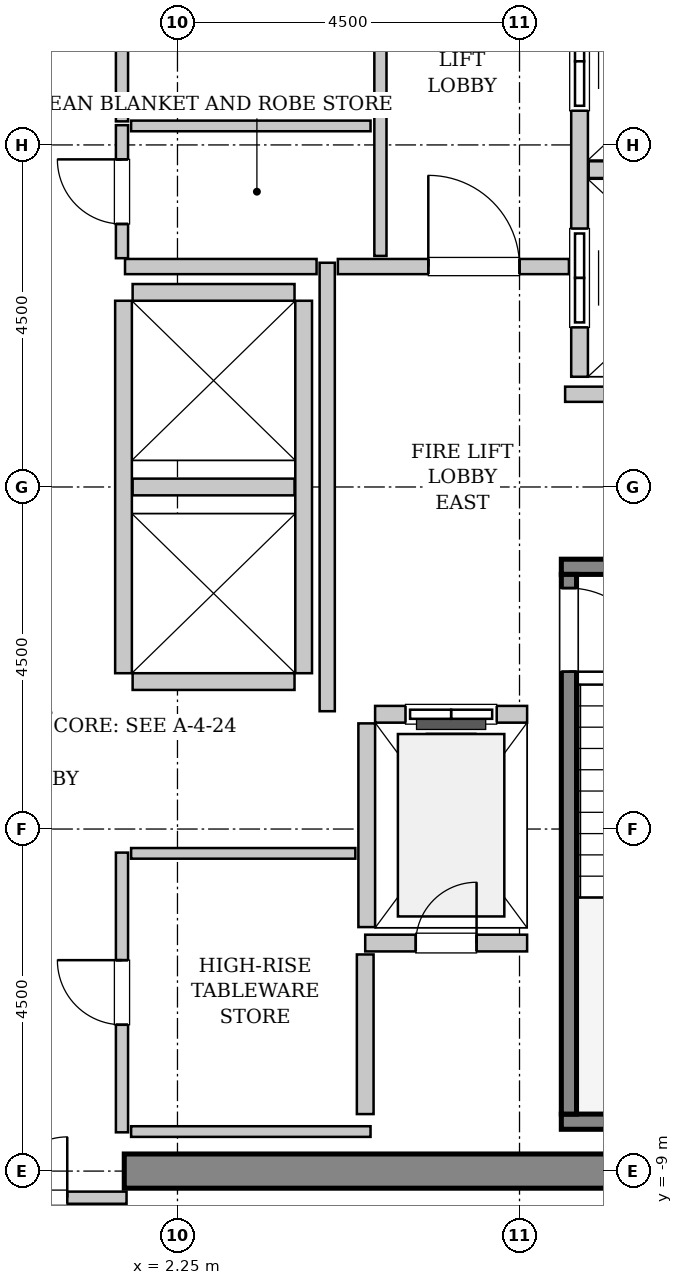
"""IFC4 building model, lengths in metres.
Left out: names, types, materials, properties, quantities, classifications, styles, units other than length and angle.
Written with IfcOpenShell. Run it as: python <this file> out.ifc"""

import sys

from ifc_helpers import new_model, si_unit, direction, frame, frame_2d, origin, place, context, subcontext, project, spatial, rectangle, extrude, source, transform, mapped, element, fill, save


model = new_model("IFC4")
c1 = context("Model", 3, precision=1e-05, world=origin(), true_north=direction((0.0, 1.0)))
c2 = subcontext(c1, "Body", "Model", "MODEL_VIEW")
j1 = project(units=[si_unit("LENGTHUNIT", "METRE"), si_unit("PLANEANGLEUNIT", "RADIAN")], contexts=[c1])
p1 = place(None, origin())
s1 = spatial("IfcSite", under=j1, at=p1, CompositionType="ELEMENT")
p2 = place(p1, origin())
s2 = spatial("IfcBuilding", under=s1, at=p2, CompositionType="ELEMENT")
p3 = place(p2, frame((0.0, 0.0, 298.8)))
s3 = spatial("IfcBuildingStorey", under=s2, at=p3, CompositionType="ELEMENT", Elevation=298.8)
m1 = source(origin(), c2, "Body", "SweptSolid", [
    extrude(rectangle(XDim=9.925, YDim=0.45, at=frame_2d((4.962, 0.0))), origin(), (0.0, 0.0, 1.0), 3.8),
])
p4 = place(p3, frame((1.55, -9.0, 0.0), z_axis=(0.0, 0.0, 1.0), x_axis=(1.0, 0.0, 0.0)))
e1 = element("IfcWall", 1, at=p4, inside=s3, PredefinedType="SHEAR", context=c2, shape_type="MappedRepresentation", body=[
    mapped(m1, transform((0.0, 0.0, 0.0), x_axis=(1.0, 0.0, 0.0), y_axis=(0.0, 1.0, 0.0), z_axis=(0.0, 0.0, 1.0), scale=1.0)),
])
m2 = source(origin(), c2, "Body", "SweptSolid", [
    extrude(rectangle(XDim=3.4, YDim=0.2, at=frame_2d((1.7, 0.0))), origin(), (0.0, 0.0, 1.0), 3.8),
])
p5 = place(p3, frame((7.3, -1.05, 0.0), z_axis=(0.0, 0.0, 1.0), x_axis=(1.0, 0.0, 0.0)))
e2 = element("IfcWall", 2, at=p5, inside=s3, PredefinedType="SOLIDWALL", context=c2, shape_type="MappedRepresentation", body=[
    mapped(m2, transform((0.0, 0.0, 0.0), x_axis=(1.0, 0.0, 0.0), y_axis=(0.0, 1.0, 0.0), z_axis=(0.0, 0.0, 1.0), scale=1.0)),
])
m3 = source(origin(), c2, "Body", "SweptSolid", [
    extrude(rectangle(XDim=3.73, YDim=0.2, at=frame_2d((1.865, 0.0))), origin(), (0.0, 0.0, 1.0), 3.8),
])
p6 = place(p3, frame((7.3, -8.35, 0.0), z_axis=(0.0, 0.0, 1.0), x_axis=(1.0, 0.0, 0.0)))
e3 = element("IfcWall", 3, at=p6, inside=s3, PredefinedType="SOLIDWALL", context=c2, shape_type="MappedRepresentation", body=[
    mapped(m3, transform((0.0, 0.0, 0.0), x_axis=(1.0, 0.0, 0.0), y_axis=(0.0, 1.0, 0.0), z_axis=(0.0, 0.0, 1.0), scale=1.0)),
])
m4 = source(origin(), c2, "Body", "SweptSolid", [
    extrude(rectangle(XDim=7.1, YDim=0.2, at=frame_2d((3.55, 0.0))), origin(), (0.0, 0.0, 1.0), 3.8),
])
p7 = place(p3, frame((7.4, -1.15, 0.0), z_axis=(0.0, 0.0, 1.0), x_axis=(0.0, -1.0, 0.0)))
e4 = element("IfcWall", 4, at=p7, inside=s3, PredefinedType="SOLIDWALL", context=c2, shape_type="MappedRepresentation", body=[
    mapped(m4, transform((0.0, 0.0, 0.0), x_axis=(1.0, 0.0, 0.0), y_axis=(0.0, 1.0, 0.0), z_axis=(0.0, 0.0, 1.0), scale=1.0)),
])
p8 = place(p7, frame((0.18, 0.0, 0.0)))
e5 = element("IfcOpeningElement", 5, at=p8, cuts=e4, PredefinedType="OPENING", context=c2, shape_type="SweptSolid", body=[
    extrude(rectangle(XDim=1.1, YDim=2.15, at=frame_2d((0.55, 1.075))), frame((0.0, 0.11, 0.0), z_axis=(0.0, -1.0, 0.0), x_axis=(1.0, 0.0, 0.0)), (0.0, 0.0, 1.0), 0.22),
])
m5 = source(origin(), c2, "Body", "SweptSolid", [
    extrude(rectangle(XDim=2.0, YDim=0.22, at=frame_2d((1.0, 0.0))), origin(), (0.0, 0.0, 1.0), 3.535),
])
p9 = place(p3, frame((6.85, -2.99, 0.0), z_axis=(0.0, 0.0, 1.0), x_axis=(-1.0, 0.0, 0.0)))
e6 = element("IfcWall", 6, at=p9, inside=s3, PredefinedType="SOLIDWALL", context=c2, shape_type="MappedRepresentation", body=[
    mapped(m5, transform((0.0, 0.0, 0.0), x_axis=(1.0, 0.0, 0.0), y_axis=(0.0, 1.0, 0.0), z_axis=(0.0, 0.0, 1.0), scale=1.0)),
])
p10 = place(p9, frame((0.4, 0.0, 0.0)))
e7 = element("IfcOpeningElement", 7, at=p10, cuts=e6, PredefinedType="OPENING", context=c2, shape_type="SweptSolid", body=[
    extrude(rectangle(XDim=1.2, YDim=2.2, at=frame_2d((0.6, 1.1))), frame((0.0, 0.12, 0.0), z_axis=(0.0, -1.0, 0.0), x_axis=(1.0, 0.0, 0.0)), (0.0, 0.0, 1.0), 0.24),
])
m6 = source(origin(), c2, "Body", "SweptSolid", [
    extrude(rectangle(XDim=2.68, YDim=0.22, at=frame_2d((1.34, 0.0))), origin(), (0.0, 0.0, 1.0), 3.535),
])
p11 = place(p3, frame((4.74, -3.11, 0.0), z_axis=(0.0, 0.0, 1.0), x_axis=(0.0, -1.0, 0.0)))
e8 = element("IfcWall", 8, at=p11, inside=s3, PredefinedType="SOLIDWALL", context=c2, shape_type="MappedRepresentation", body=[
    mapped(m6, transform((0.0, 0.0, 0.0), x_axis=(1.0, 0.0, 0.0), y_axis=(0.0, 1.0, 0.0), z_axis=(0.0, 0.0, 1.0), scale=1.0)),
])
m7 = source(origin(), c2, "Body", "SweptSolid", [
    extrude(rectangle(XDim=5.45, YDim=0.22, at=frame_2d((2.725, 0.0))), origin(), (0.0, 0.0, 1.0), 3.535),
])
p12 = place(p3, frame((7.54, 6.9, 0.0), z_axis=(0.0, 0.0, 1.0), x_axis=(0.0, -1.0, 0.0)))
e9 = element("IfcWall", 9, at=p12, inside=s3, PredefinedType="SOLIDWALL", context=c2, shape_type="MappedRepresentation", body=[
    mapped(m7, transform((0.0, 0.0, 0.0), x_axis=(1.0, 0.0, 0.0), y_axis=(0.0, 1.0, 0.0), z_axis=(0.0, 0.0, 1.0), scale=1.0)),
])
p13 = place(p12, frame((3.5, 0.0, 0.0)))
e10 = element("IfcOpeningElement", 10, at=p13, cuts=e9, PredefinedType="OPENING", context=c2, shape_type="SweptSolid", body=[
    extrude(rectangle(XDim=1.3, YDim=2.3, at=frame_2d((0.65, 1.15))), frame((0.0, 0.12, 0.0), z_axis=(0.0, -1.0, 0.0), x_axis=(1.0, 0.0, 0.0)), (0.0, 0.0, 1.0), 0.24),
])
p14 = place(p12, frame((0.65, 0.0, 0.0)))
e11 = element("IfcOpeningElement", 11, at=p14, cuts=e9, PredefinedType="OPENING", context=c2, shape_type="SweptSolid", body=[
    extrude(rectangle(XDim=1.3, YDim=2.3, at=frame_2d((0.65, 1.15))), frame((0.0, 0.12, 0.0), z_axis=(0.0, -1.0, 0.0), x_axis=(1.0, 0.0, 0.0)), (0.0, 0.0, 1.0), 0.24),
])
m8 = source(origin(), c2, "Body", "SweptSolid", [
    extrude(rectangle(XDim=2.78, YDim=0.22, at=frame_2d((1.39, 0.0))), origin(), (0.0, 0.0, 1.0), 3.535),
])
p15 = place(p3, frame((7.66, 4.175, 0.0), z_axis=(0.0, 0.0, 1.0), x_axis=(1.0, 0.0, 0.0)))
e12 = element("IfcWall", 12, at=p15, inside=s3, PredefinedType="SOLIDWALL", context=c2, shape_type="MappedRepresentation", body=[
    mapped(m8, transform((0.0, 0.0, 0.0), x_axis=(1.0, 0.0, 0.0), y_axis=(0.0, 1.0, 0.0), z_axis=(0.0, 0.0, 1.0), scale=1.0)),
])
m9 = source(origin(), c2, "Body", "SweptSolid", [
    extrude(rectangle(XDim=4.9, YDim=0.22, at=frame_2d((2.45, 0.0))), origin(), (0.0, 0.0, 1.0), 3.535),
])
for number, where, z_axis, x_axis in (
    (13, (1.54, 2.45, 0.0), (0.0, 0.0, 1.0), (0.0, -1.0, 0.0)),
    (14, (3.91, -2.45, 0.0), (0.0, 0.0, 1.0), (0.0, 1.0, 0.0)),
):
    element("IfcWall", number, at=place(p3, frame(where, z_axis=z_axis, x_axis=x_axis)), inside=s3, PredefinedType="SOLIDWALL", context=c2, shape_type="MappedRepresentation", body=[
        mapped(m9, transform((0.0, 0.0, 0.0), x_axis=(1.0, 0.0, 0.0), y_axis=(0.0, 1.0, 0.0), z_axis=(0.0, 0.0, 1.0), scale=1.0)),
    ])
m10 = source(origin(), c2, "Body", "SweptSolid", [
    extrude(rectangle(XDim=2.13, YDim=0.22, at=frame_2d((1.065, 0.0))), origin(), (0.0, 0.0, 1.0), 3.535),
])
for number, where, z_axis, x_axis in (
    (15, (1.66, -2.56, 0.0), (0.0, 0.0, 1.0), (1.0, 0.0, 0.0)),
    (16, (1.66, 0.0, 0.0), (0.0, 0.0, 1.0), (1.0, 0.0, 0.0)),
    (17, (3.79, 2.56, 0.0), (0.0, 0.0, 1.0), (-1.0, 0.0, 0.0)),
):
    element("IfcWall", number, at=place(p3, frame(where, z_axis=z_axis, x_axis=x_axis)), inside=s3, PredefinedType="SOLIDWALL", context=c2, shape_type="MappedRepresentation", body=[
        mapped(m10, transform((0.0, 0.0, 0.0), x_axis=(1.0, 0.0, 0.0), y_axis=(0.0, 1.0, 0.0), z_axis=(0.0, 0.0, 1.0), scale=1.0)),
    ])
p16 = place(p3, frame((4.72, -6.0, 0.0), z_axis=(0.0, 0.0, 1.0), x_axis=(1.0, 0.0, 0.0)))
e18 = element("IfcWall", 18, at=p16, inside=s3, PredefinedType="SOLIDWALL", context=c2, shape_type="MappedRepresentation", body=[
    mapped(m10, transform((0.0, 0.0, 0.0), x_axis=(1.0, 0.0, 0.0), y_axis=(0.0, 1.0, 0.0), z_axis=(0.0, 0.0, 1.0), scale=1.0)),
])
p17 = place(p16, frame((0.665, 0.0, 0.0)))
e19 = element("IfcOpeningElement", 19, at=p17, cuts=e18, PredefinedType="OPENING", context=c2, shape_type="SweptSolid", body=[
    extrude(rectangle(XDim=0.8, YDim=2.0, at=frame_2d((0.4, 1.0))), frame((0.0, 0.12, 0.0), z_axis=(0.0, -1.0, 0.0), x_axis=(1.0, 0.0, 0.0)), (0.0, 0.0, 1.0), 0.24),
])
m11 = source(origin(), c2, "Body", "SweptSolid", [
    extrude(rectangle(XDim=2.1, YDim=0.22, at=frame_2d((1.05, 0.0))), origin(), (0.0, 0.0, 1.0), 3.535),
])
p18 = place(p3, frame((4.72, -8.25, 0.0), z_axis=(0.0, 0.0, 1.0), x_axis=(0.0, 1.0, 0.0)))
e20 = element("IfcWall", 20, at=p18, inside=s3, PredefinedType="SOLIDWALL", context=c2, shape_type="MappedRepresentation", body=[
    mapped(m11, transform((0.0, 0.0, 0.0), x_axis=(1.0, 0.0, 0.0), y_axis=(0.0, 1.0, 0.0), z_axis=(0.0, 0.0, 1.0), scale=1.0)),
])
m12 = source(origin(), c2, "Body", "SweptSolid", [
    extrude(rectangle(XDim=5.9, YDim=0.2, at=frame_2d((2.95, 0.0))), origin(), (0.0, 0.0, 1.0), 3.535),
])
p19 = place(p3, frame((4.22, -2.95, 0.0), z_axis=(0.0, 0.0, 1.0), x_axis=(0.0, 1.0, 0.0)))
e21 = element("IfcWall", 21, at=p19, inside=s3, PredefinedType="PARTITIONING", context=c2, shape_type="MappedRepresentation", body=[
    mapped(m12, transform((0.0, 0.0, 0.0), x_axis=(1.0, 0.0, 0.0), y_axis=(0.0, 1.0, 0.0), z_axis=(0.0, 0.0, 1.0), scale=1.0)),
])
m13 = source(origin(), c2, "Body", "SweptSolid", [
    extrude(rectangle(XDim=2.52, YDim=0.2, at=frame_2d((1.26, 0.0))), origin(), (0.0, 0.0, 1.0), 3.535),
])
p20 = place(p3, frame((1.56, 2.9, 0.0), z_axis=(0.0, 0.0, 1.0), x_axis=(1.0, 0.0, 0.0)))
e22 = element("IfcWall", 22, at=p20, inside=s3, PredefinedType="PARTITIONING", context=c2, shape_type="MappedRepresentation", body=[
    mapped(m13, transform((0.0, 0.0, 0.0), x_axis=(1.0, 0.0, 0.0), y_axis=(0.0, 1.0, 0.0), z_axis=(0.0, 0.0, 1.0), scale=1.0)),
])
m14 = source(origin(), c2, "Body", "SweptSolid", [
    extrude(rectangle(XDim=3.04, YDim=0.2, at=frame_2d((1.52, 0.0))), origin(), (0.0, 0.0, 1.0), 3.535),
])
p21 = place(p3, frame((4.36, 2.9, 0.0), z_axis=(0.0, 0.0, 1.0), x_axis=(1.0, 0.0, 0.0)))
e23 = element("IfcWall", 23, at=p21, inside=s3, PredefinedType="PARTITIONING", context=c2, shape_type="MappedRepresentation", body=[
    mapped(m14, transform((0.0, 0.0, 0.0), x_axis=(1.0, 0.0, 0.0), y_axis=(0.0, 1.0, 0.0), z_axis=(0.0, 0.0, 1.0), scale=1.0)),
])
p22 = place(p21, frame((1.19, 0.0, 0.0)))
e24 = element("IfcOpeningElement", 24, at=p22, cuts=e23, PredefinedType="OPENING", context=c2, shape_type="SweptSolid", body=[
    extrude(rectangle(XDim=1.2, YDim=2.15, at=frame_2d((0.6, 1.075))), frame((0.0, 0.11, 0.0), z_axis=(0.0, -1.0, 0.0), x_axis=(1.0, 0.0, 0.0)), (0.0, 0.0, 1.0), 0.22),
])
m15 = source(origin(), c2, "Body", "SweptSolid", [
    extrude(rectangle(XDim=4.11, YDim=0.2, at=frame_2d((2.055, 0.0))), origin(), (0.0, 0.0, 1.0), 3.535),
])
p23 = place(p3, frame((7.35, 1.22, 0.0), z_axis=(0.0, 0.0, 1.0), x_axis=(1.0, 0.0, 0.0)))
e25 = element("IfcWall", 25, at=p23, inside=s3, PredefinedType="PARTITIONING", context=c2, shape_type="MappedRepresentation", body=[
    mapped(m15, transform((0.0, 0.0, 0.0), x_axis=(1.0, 0.0, 0.0), y_axis=(0.0, 1.0, 0.0), z_axis=(0.0, 0.0, 1.0), scale=1.0)),
])
m16 = source(origin(), c2, "Body", "SweptSolid", [
    extrude(rectangle(XDim=3.16, YDim=0.16, at=frame_2d((1.58, 0.0))), origin(), (0.0, 0.0, 1.0), 2.625),
])
p24 = place(p3, frame((-1.58, -9.35, 0.0), z_axis=(0.0, 0.0, 1.0), x_axis=(1.0, 0.0, 0.0)))
e26 = element("IfcWall", 26, at=p24, inside=s3, PredefinedType="PARTITIONING", context=c2, shape_type="MappedRepresentation", body=[
    mapped(m16, transform((0.0, 0.0, 0.0), x_axis=(1.0, 0.0, 0.0), y_axis=(0.0, 1.0, 0.0), z_axis=(0.0, 0.0, 1.0), scale=1.0)),
])
p25 = place(p24, frame((0.78, 0.0, 0.0)))
e27 = element("IfcOpeningElement", 27, at=p25, cuts=e26, PredefinedType="OPENING", context=c2, shape_type="SweptSolid", body=[
    extrude(rectangle(XDim=1.6, YDim=2.3, at=frame_2d((0.8, 1.15))), frame((0.0, 0.09, 0.0), z_axis=(0.0, -1.0, 0.0), x_axis=(1.0, 0.0, 0.0)), (0.0, 0.0, 1.0), 0.18),
])
m17 = source(origin(), c2, "Body", "SweptSolid", [
    extrude(rectangle(XDim=5.45, YDim=0.16, at=frame_2d((2.725, 0.0))), origin(), (0.0, 0.0, 1.0), 3.535),
])
p26 = place(p3, frame((4.92, 3.04, 0.0), z_axis=(0.0, 0.0, 1.0), x_axis=(0.0, 1.0, 0.0)))
e28 = element("IfcWall", 28, at=p26, inside=s3, PredefinedType="PARTITIONING", context=c2, shape_type="MappedRepresentation", body=[
    mapped(m17, transform((0.0, 0.0, 0.0), x_axis=(1.0, 0.0, 0.0), y_axis=(0.0, 1.0, 0.0), z_axis=(0.0, 0.0, 1.0), scale=1.0)),
])
m18 = source(origin(), c2, "Body", "SweptSolid", [
    extrude(rectangle(XDim=1.75, YDim=0.16, at=frame_2d((0.875, 0.0))), origin(), (0.0, 0.0, 1.0), 3.535),
])
p27 = place(p3, frame((1.52, 3.01, 0.0), z_axis=(0.0, 0.0, 1.0), x_axis=(0.0, 1.0, 0.0)))
e29 = element("IfcWall", 29, at=p27, inside=s3, PredefinedType="PARTITIONING", context=c2, shape_type="MappedRepresentation", body=[
    mapped(m18, transform((0.0, 0.0, 0.0), x_axis=(1.0, 0.0, 0.0), y_axis=(0.0, 1.0, 0.0), z_axis=(0.0, 0.0, 1.0), scale=1.0)),
])
p28 = place(p27, frame((0.45, 0.0, 0.0)))
e30 = element("IfcOpeningElement", 30, at=p28, cuts=e29, PredefinedType="OPENING", context=c2, shape_type="SweptSolid", body=[
    extrude(rectangle(XDim=0.85, YDim=2.1, at=frame_2d((0.425, 1.05))), frame((0.0, 0.09, 0.0), z_axis=(0.0, -1.0, 0.0), x_axis=(1.0, 0.0, 0.0)), (0.0, 0.0, 1.0), 0.18),
])
m19 = source(origin(), c2, "Body", "SweptSolid", [
    extrude(rectangle(XDim=3.15, YDim=0.14, at=frame_2d((1.575, 0.0))), origin(), (0.0, 0.0, 1.0), 3.535),
])
p29 = place(p3, frame((1.64, 4.75, 0.0), z_axis=(0.0, 0.0, 1.0), x_axis=(1.0, 0.0, 0.0)))
e31 = element("IfcWall", 31, at=p29, inside=s3, PredefinedType="PARTITIONING", context=c2, shape_type="MappedRepresentation", body=[
    mapped(m19, transform((0.0, 0.0, 0.0), x_axis=(1.0, 0.0, 0.0), y_axis=(0.0, 1.0, 0.0), z_axis=(0.0, 0.0, 1.0), scale=1.0)),
])
m20 = source(origin(), c2, "Body", "SweptSolid", [
    extrude(rectangle(XDim=3.68, YDim=0.16, at=frame_2d((1.84, 0.0))), origin(), (0.0, 0.0, 1.0), 3.535),
])
p30 = place(p3, frame((1.52, 4.81, 0.0), z_axis=(0.0, 0.0, 1.0), x_axis=(0.0, 1.0, 0.0)))
e32 = element("IfcWall", 32, at=p30, inside=s3, PredefinedType="PARTITIONING", context=c2, shape_type="MappedRepresentation", body=[
    mapped(m20, transform((0.0, 0.0, 0.0), x_axis=(1.0, 0.0, 0.0), y_axis=(0.0, 1.0, 0.0), z_axis=(0.0, 0.0, 1.0), scale=1.0)),
])
p31 = place(p30, frame((1.415, 0.0, 0.0)))
e33 = element("IfcOpeningElement", 33, at=p31, cuts=e32, PredefinedType="OPENING", context=c2, shape_type="SweptSolid", body=[
    extrude(rectangle(XDim=0.85, YDim=2.1, at=frame_2d((0.425, 1.05))), frame((0.0, 0.09, 0.0), z_axis=(0.0, -1.0, 0.0), x_axis=(1.0, 0.0, 0.0)), (0.0, 0.0, 1.0), 0.18),
])
p32 = place(p3, frame((1.52, -8.49, 0.0), z_axis=(0.0, 0.0, 1.0), x_axis=(0.0, 1.0, 0.0)))
e34 = element("IfcWall", 34, at=p32, inside=s3, PredefinedType="PARTITIONING", context=c2, shape_type="MappedRepresentation", body=[
    mapped(m20, transform((0.0, 0.0, 0.0), x_axis=(1.0, 0.0, 0.0), y_axis=(0.0, 1.0, 0.0), z_axis=(0.0, 0.0, 1.0), scale=1.0)),
])
p33 = place(p32, frame((1.415, 0.0, 0.0)))
e35 = element("IfcOpeningElement", 35, at=p33, cuts=e34, PredefinedType="OPENING", context=c2, shape_type="SweptSolid", body=[
    extrude(rectangle(XDim=0.85, YDim=2.1, at=frame_2d((0.425, 1.05))), frame((0.0, 0.09, 0.0), z_axis=(0.0, -1.0, 0.0), x_axis=(1.0, 0.0, 0.0)), (0.0, 0.0, 1.0), 0.18),
])
m21 = source(origin(), c2, "Body", "SweptSolid", [
    extrude(rectangle(XDim=2.95, YDim=0.14, at=frame_2d((1.475, 0.0))), origin(), (0.0, 0.0, 1.0), 3.535),
])
p34 = place(p3, frame((1.64, -4.82, 0.0), z_axis=(0.0, 0.0, 1.0), x_axis=(1.0, 0.0, 0.0)))
e36 = element("IfcWall", 36, at=p34, inside=s3, PredefinedType="PARTITIONING", context=c2, shape_type="MappedRepresentation", body=[
    mapped(m21, transform((0.0, 0.0, 0.0), x_axis=(1.0, 0.0, 0.0), y_axis=(0.0, 1.0, 0.0), z_axis=(0.0, 0.0, 1.0), scale=1.0)),
])
p35 = place(p3, frame((1.64, -8.48, 0.0), z_axis=(0.0, 0.0, 1.0), x_axis=(1.0, 0.0, 0.0)))
e37 = element("IfcWall", 37, at=p35, inside=s3, PredefinedType="PARTITIONING", context=c2, shape_type="MappedRepresentation", body=[
    mapped(m19, transform((0.0, 0.0, 0.0), x_axis=(1.0, 0.0, 0.0), y_axis=(0.0, 1.0, 0.0), z_axis=(0.0, 0.0, 1.0), scale=1.0)),
])
m22 = source(origin(), c2, "Body", "SweptSolid", [
    extrude(rectangle(XDim=1.1, YDim=2.15, at=frame_2d((0.55, 1.075))), frame((0.0, 0.025, 0.0), z_axis=(0.0, -1.0, 0.0), x_axis=(1.0, 0.0, 0.0)), (0.0, 0.0, 1.0), 0.05),
])
p36 = place(p8, origin())
e38 = element("IfcDoor", 38, at=p36, inside=s3, OperationType="SINGLE_SWING_RIGHT", PredefinedType="DOOR", context=c2, shape_type="MappedRepresentation", body=[
    mapped(m22, transform((0.0, 0.0, 0.0), x_axis=(1.0, 0.0, 0.0), y_axis=(0.0, 1.0, 0.0), z_axis=(0.0, 0.0, 1.0), scale=1.0)),
])
fill(e5, e38)
m23 = source(origin(), c2, "Body", "SweptSolid", [
    extrude(rectangle(XDim=1.2, YDim=2.2, at=frame_2d((0.6, 1.1))), frame((0.0, 0.025, 0.0), z_axis=(0.0, -1.0, 0.0), x_axis=(1.0, 0.0, 0.0)), (0.0, 0.0, 1.0), 0.05),
])
p37 = place(p10, origin())
e39 = element("IfcDoor", 39, at=p37, inside=s3, OperationType="SLIDING_TO_LEFT", PredefinedType="DOOR", context=c2, shape_type="MappedRepresentation", body=[
    mapped(m23, transform((0.0, 0.0, 0.0), x_axis=(1.0, 0.0, 0.0), y_axis=(0.0, 1.0, 0.0), z_axis=(0.0, 0.0, 1.0), scale=1.0)),
])
fill(e7, e39)
m24 = source(origin(), c2, "Body", "SweptSolid", [
    extrude(rectangle(XDim=1.3, YDim=2.3, at=frame_2d((0.65, 1.15))), frame((0.0, 0.025, 0.0), z_axis=(0.0, -1.0, 0.0), x_axis=(1.0, 0.0, 0.0)), (0.0, 0.0, 1.0), 0.05),
])
p38 = place(p13, origin())
e40 = element("IfcDoor", 40, at=p38, inside=s3, OperationType="SLIDING_TO_RIGHT", PredefinedType="DOOR", context=c2, shape_type="MappedRepresentation", body=[
    mapped(m24, transform((0.0, 0.0, 0.0), x_axis=(1.0, 0.0, 0.0), y_axis=(0.0, 1.0, 0.0), z_axis=(0.0, 0.0, 1.0), scale=1.0)),
])
fill(e10, e40)
p39 = place(p14, origin())
e41 = element("IfcDoor", 41, at=p39, inside=s3, OperationType="SLIDING_TO_RIGHT", PredefinedType="DOOR", context=c2, shape_type="MappedRepresentation", body=[
    mapped(m24, transform((0.0, 0.0, 0.0), x_axis=(1.0, 0.0, 0.0), y_axis=(0.0, 1.0, 0.0), z_axis=(0.0, 0.0, 1.0), scale=1.0)),
])
fill(e11, e41)
m25 = source(origin(), c2, "Body", "SweptSolid", [
    extrude(rectangle(XDim=0.8, YDim=2.0, at=frame_2d((0.4, 1.0))), frame((0.0, 0.025, 0.0), z_axis=(0.0, -1.0, 0.0), x_axis=(1.0, 0.0, 0.0)), (0.0, 0.0, 1.0), 0.05),
])
p40 = place(p17, origin())
e42 = element("IfcDoor", 42, at=p40, inside=s3, OperationType="SINGLE_SWING_RIGHT", PredefinedType="TRAPDOOR", context=c2, shape_type="MappedRepresentation", body=[
    mapped(m25, transform((0.0, 0.0, 0.0), x_axis=(1.0, 0.0, 0.0), y_axis=(0.0, 1.0, 0.0), z_axis=(0.0, 0.0, 1.0), scale=1.0)),
])
fill(e19, e42)
m26 = source(origin(), c2, "Body", "SweptSolid", [
    extrude(rectangle(XDim=1.2, YDim=2.15, at=frame_2d((0.6, 1.075))), frame((0.0, 0.025, 0.0), z_axis=(0.0, -1.0, 0.0), x_axis=(1.0, 0.0, 0.0)), (0.0, 0.0, 1.0), 0.05),
])
p41 = place(p22, origin())
e43 = element("IfcDoor", 43, at=p41, inside=s3, OperationType="SINGLE_SWING_LEFT", PredefinedType="DOOR", context=c2, shape_type="MappedRepresentation", body=[
    mapped(m26, transform((0.0, 0.0, 0.0), x_axis=(1.0, 0.0, 0.0), y_axis=(0.0, 1.0, 0.0), z_axis=(0.0, 0.0, 1.0), scale=1.0)),
])
fill(e24, e43)
m27 = source(origin(), c2, "Body", "SweptSolid", [
    extrude(rectangle(XDim=1.6, YDim=2.3, at=frame_2d((0.8, 1.15))), frame((0.0, 0.025, 0.0), z_axis=(0.0, -1.0, 0.0), x_axis=(1.0, 0.0, 0.0)), (0.0, 0.0, 1.0), 0.05),
])
p42 = place(p25, origin())
e44 = element("IfcDoor", 44, at=p42, inside=s3, OperationType="DOUBLE_DOOR_SINGLE_SWING", PredefinedType="DOOR", context=c2, shape_type="MappedRepresentation", body=[
    mapped(m27, transform((0.0, 0.0, 0.0), x_axis=(1.0, 0.0, 0.0), y_axis=(0.0, 1.0, 0.0), z_axis=(0.0, 0.0, 1.0), scale=1.0)),
])
fill(e27, e44)
m28 = source(origin(), c2, "Body", "SweptSolid", [
    extrude(rectangle(XDim=0.85, YDim=2.1, at=frame_2d((0.425, 1.05))), frame((0.0, 0.025, 0.0), z_axis=(0.0, -1.0, 0.0), x_axis=(1.0, 0.0, 0.0)), (0.0, 0.0, 1.0), 0.05),
])
p43 = place(p28, origin())
e45 = element("IfcDoor", 45, at=p43, inside=s3, OperationType="SINGLE_SWING_RIGHT", PredefinedType="DOOR", context=c2, shape_type="MappedRepresentation", body=[
    mapped(m28, transform((0.0, 0.0, 0.0), x_axis=(1.0, 0.0, 0.0), y_axis=(0.0, 1.0, 0.0), z_axis=(0.0, 0.0, 1.0), scale=1.0)),
])
fill(e30, e45)
p44 = place(p33, origin())
e46 = element("IfcDoor", 46, at=p44, inside=s3, OperationType="SINGLE_SWING_RIGHT", PredefinedType="DOOR", context=c2, shape_type="MappedRepresentation", body=[
    mapped(m28, transform((0.0, 0.0, 0.0), x_axis=(1.0, 0.0, 0.0), y_axis=(0.0, 1.0, 0.0), z_axis=(0.0, 0.0, 1.0), scale=1.0)),
])
fill(e35, e46)
save(model, sys.argv[1])
